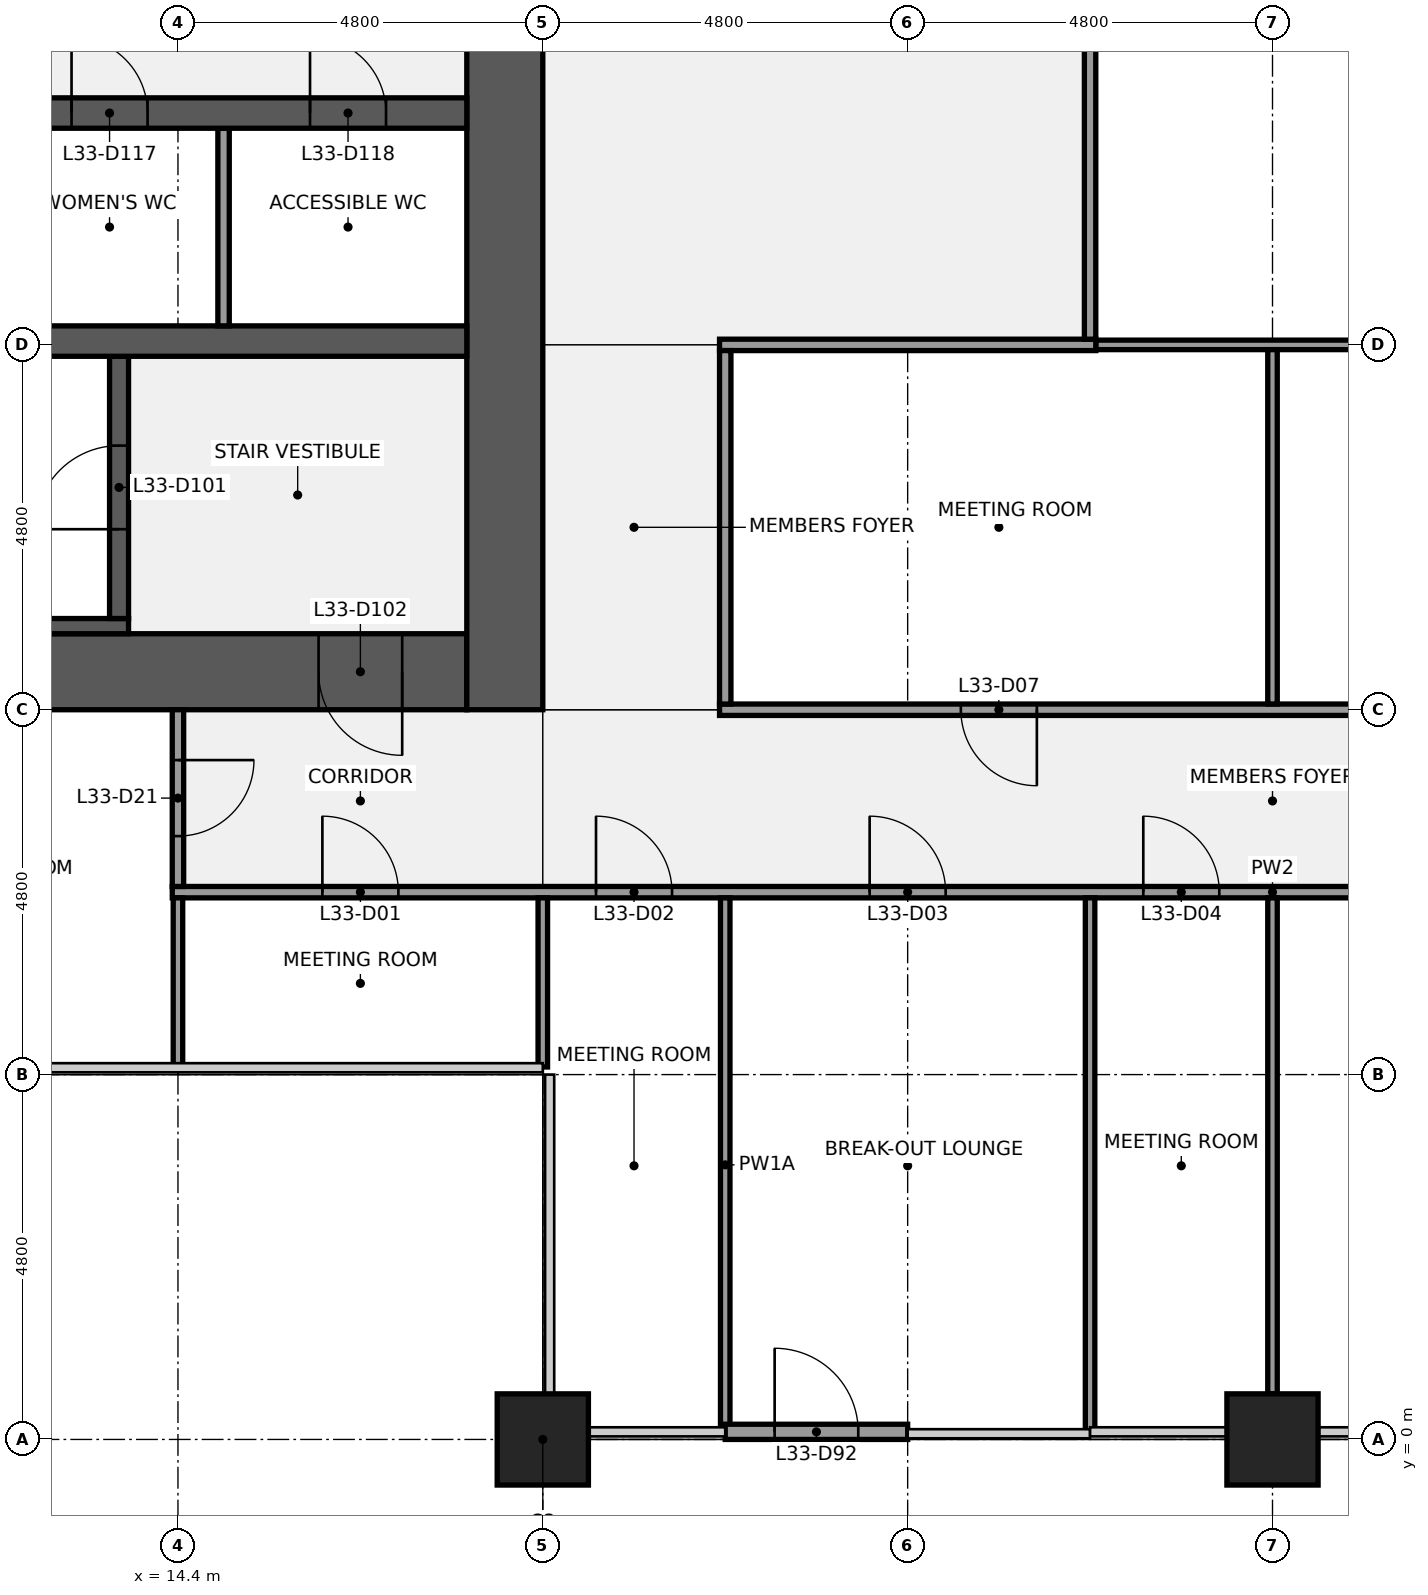
"""IFC4 building model, lengths in metres.
Left out: names, types, materials, properties, quantities, classifications, styles, units other than length and angle.
Written with IfcOpenShell. Run it as: python <this file> out.ifc"""

import sys

from ifc_helpers import new_model, si_unit, direction, frame, frame_2d, origin, origin_2d, place, context, subcontext, project, spatial, rectangle, extrude, element, fill, save


model = new_model("IFC4")
c1 = context("Model", 3, precision=1e-05, world=origin(), true_north=direction((0.0, 1.0)))
c2 = subcontext(c1, "Body", "Model", "MODEL_VIEW")
j1 = project(units=[si_unit("LENGTHUNIT", "METRE"), si_unit("PLANEANGLEUNIT", "RADIAN")], contexts=[c1])
p1 = place(None, origin())
s1 = spatial("IfcSite", under=j1, at=p1, CompositionType="ELEMENT")
p2 = place(p1, origin())
s2 = spatial("IfcBuilding", under=s1, at=p2, CompositionType="ELEMENT")
p3 = place(p2, frame((0.0, 0.0, 152.1)))
s3 = spatial("IfcBuildingStorey", under=s2, at=p3, CompositionType="ELEMENT", Elevation=152.1)
for number, where, z_axis, x_axis in (
    (1, (19.2, 0.0, 0.0), (0.0, 0.0, 1.0), (1.0, 0.0, 0.0)),
    (2, (28.8, 0.0, 0.0), (0.0, 0.0, 1.0), (1.0, 0.0, 0.0)),
):
    element("IfcColumn", number, at=place(p3, frame(where, z_axis=z_axis, x_axis=x_axis)), inside=s3, PredefinedType="COLUMN", context=c2, shape_type="SweptSolid", body=[
        extrude(rectangle(XDim=1.2, YDim=1.2, at=origin_2d()), origin(), (0.0, 0.0, 1.0), 4.0),
    ])
p4 = place(p3, frame((18.2, 10.1, 0.0), z_axis=(0.0, 0.0, 1.0), x_axis=(-1.0, 0.0, 0.0)))
e3 = element("IfcWall", 3, at=p4, inside=s3, PredefinedType="SHEAR", context=c2, shape_type="SweptSolid", body=[
    extrude(rectangle(XDim=8.6, YDim=1.0, at=frame_2d((4.3, 0.0))), origin(), (0.0, 0.0, 1.0), 3.84),
])
p5 = place(p4, frame((0.85, 0.0, 0.0)))
e4 = element("IfcOpeningElement", 4, at=p5, cuts=e3, PredefinedType="OPENING", context=c2, shape_type="SweptSolid", body=[
    extrude(rectangle(XDim=1.1, YDim=2.1, at=frame_2d((0.55, 1.05))), frame((0.0, 0.51, 0.0), z_axis=(0.0, -1.0, 0.0), x_axis=(1.0, 0.0, 0.0)), (0.0, 0.0, 1.0), 1.02),
])
p6 = place(p3, frame((18.7, 38.4, 0.0), z_axis=(0.0, 0.0, 1.0), x_axis=(0.0, -1.0, 0.0)))
e5 = element("IfcWall", 5, at=p6, inside=s3, PredefinedType="SHEAR", context=c2, shape_type="SweptSolid", body=[
    extrude(rectangle(XDim=28.8, YDim=1.0, at=frame_2d((14.4, 0.0))), origin(), (0.0, 0.0, 1.0), 3.84),
])
p7 = place(p6, frame((18.3, 0.0, 0.0)))
e6 = element("IfcOpeningElement", 6, at=p7, cuts=e5, PredefinedType="OPENING", context=c2, shape_type="SweptSolid", body=[
    extrude(rectangle(XDim=1.8, YDim=2.1, at=frame_2d((0.9, 1.05))), frame((0.0, 0.51, 0.0), z_axis=(0.0, -1.0, 0.0), x_axis=(1.0, 0.0, 0.0)), (0.0, 0.0, 1.0), 1.02),
])
p8 = place(p6, frame((8.7, 0.0, 0.0)))
e7 = element("IfcOpeningElement", 7, at=p8, cuts=e5, PredefinedType="OPENING", context=c2, shape_type="SweptSolid", body=[
    extrude(rectangle(XDim=1.8, YDim=2.1, at=frame_2d((0.9, 1.05))), frame((0.0, 0.51, 0.0), z_axis=(0.0, -1.0, 0.0), x_axis=(1.0, 0.0, 0.0)), (0.0, 0.0, 1.0), 1.02),
])
p9 = place(p3, frame((9.6, 10.7, 0.0), z_axis=(0.0, 0.0, 1.0), x_axis=(1.0, 0.0, 0.0)))
e8 = element("IfcWall", 8, at=p9, inside=s3, PredefinedType="SHEAR", context=c2, shape_type="SweptSolid", body=[
    extrude(rectangle(XDim=4.15, YDim=0.2, at=frame_2d((2.075, 0.0))), origin(), (0.0, 0.0, 1.0), 3.84),
])
p10 = place(p3, frame((13.625, 10.8, 0.0), z_axis=(0.0, 0.0, 1.0), x_axis=(0.0, 1.0, 0.0)))
e9 = element("IfcWall", 9, at=p10, inside=s3, PredefinedType="SHEAR", context=c2, shape_type="SweptSolid", body=[
    extrude(rectangle(XDim=3.45, YDim=0.25, at=frame_2d((1.725, 0.0))), origin(), (0.0, 0.0, 1.0), 3.84),
])
p11 = place(p10, frame((1.175, 0.0, 0.0)))
e10 = element("IfcOpeningElement", 10, at=p11, cuts=e9, PredefinedType="OPENING", context=c2, shape_type="SweptSolid", body=[
    extrude(rectangle(XDim=1.1, YDim=2.1, at=frame_2d((0.55, 1.05))), frame((0.0, 0.135, 0.0), z_axis=(0.0, -1.0, 0.0), x_axis=(1.0, 0.0, 0.0)), (0.0, 0.0, 1.0), 0.27),
])
p12 = place(p3, frame((1.0, 14.45, 0.0), z_axis=(0.0, 0.0, 1.0), x_axis=(1.0, 0.0, 0.0)))
e11 = element("IfcWall", 11, at=p12, inside=s3, PredefinedType="SHEAR", context=c2, shape_type="SweptSolid", body=[
    extrude(rectangle(XDim=17.2, YDim=0.4, at=frame_2d((8.6, 0.0))), origin(), (0.0, 0.0, 1.0), 3.84),
])
p13 = place(p3, frame((15.0, 14.65, 0.0), z_axis=(0.0, 0.0, 1.0), x_axis=(0.0, 1.0, 0.0)))
e12 = element("IfcWall", 12, at=p13, inside=s3, PredefinedType="PARTITIONING", context=c2, shape_type="SweptSolid", body=[
    extrude(rectangle(XDim=2.6, YDim=0.15, at=frame_2d((1.3, 0.0))), origin(), (0.0, 0.0, 1.0), 3.84),
])
p14 = place(p3, frame((1.0, 17.45, 0.0), z_axis=(0.0, 0.0, 1.0), x_axis=(1.0, 0.0, 0.0)))
e13 = element("IfcWall", 13, at=p14, inside=s3, PredefinedType="SHEAR", context=c2, shape_type="SweptSolid", body=[
    extrude(rectangle(XDim=17.2, YDim=0.4, at=frame_2d((8.6, 0.0))), origin(), (0.0, 0.0, 1.0), 3.84),
])
p15 = place(p14, frame((0.762, 0.0, 0.0)))
e14 = element("IfcOpeningElement", 14, at=p15, cuts=e13, PredefinedType="OPENING", context=c2, shape_type="SweptSolid", body=[
    extrude(rectangle(XDim=1.0, YDim=2.1, at=frame_2d((0.5, 1.05))), frame((0.0, 0.21, 0.0), z_axis=(0.0, -1.0, 0.0), x_axis=(1.0, 0.0, 0.0)), (0.0, 0.0, 1.0), 0.42),
])
p16 = place(p14, frame((3.3, 0.0, 0.0)))
e15 = element("IfcOpeningElement", 15, at=p16, cuts=e13, PredefinedType="OPENING", context=c2, shape_type="SweptSolid", body=[
    extrude(rectangle(XDim=1.0, YDim=2.1, at=frame_2d((0.5, 1.05))), frame((0.0, 0.21, 0.0), z_axis=(0.0, -1.0, 0.0), x_axis=(1.0, 0.0, 0.0)), (0.0, 0.0, 1.0), 0.42),
])
p17 = place(p14, frame((7.5, 0.0, 0.0)))
e16 = element("IfcOpeningElement", 16, at=p17, cuts=e13, PredefinedType="OPENING", context=c2, shape_type="SweptSolid", body=[
    extrude(rectangle(XDim=1.0, YDim=2.1, at=frame_2d((0.5, 1.05))), frame((0.0, 0.21, 0.0), z_axis=(0.0, -1.0, 0.0), x_axis=(1.0, 0.0, 0.0)), (0.0, 0.0, 1.0), 0.42),
])
p18 = place(p14, frame((12.0, 0.0, 0.0)))
e17 = element("IfcOpeningElement", 17, at=p18, cuts=e13, PredefinedType="OPENING", context=c2, shape_type="SweptSolid", body=[
    extrude(rectangle(XDim=1.0, YDim=2.1, at=frame_2d((0.5, 1.05))), frame((0.0, 0.21, 0.0), z_axis=(0.0, -1.0, 0.0), x_axis=(1.0, 0.0, 0.0)), (0.0, 0.0, 1.0), 0.42),
])
p19 = place(p14, frame((15.137, 0.0, 0.0)))
e18 = element("IfcOpeningElement", 18, at=p19, cuts=e13, PredefinedType="OPENING", context=c2, shape_type="SweptSolid", body=[
    extrude(rectangle(XDim=1.0, YDim=2.1, at=frame_2d((0.5, 1.05))), frame((0.0, 0.21, 0.0), z_axis=(0.0, -1.0, 0.0), x_axis=(1.0, 0.0, 0.0)), (0.0, 0.0, 1.0), 0.42),
])
p20 = place(p3, frame((14.325, 7.2, 0.0), z_axis=(0.0, 0.0, 1.0), x_axis=(1.0, 0.0, 0.0)))
e19 = element("IfcWall", 19, at=p20, inside=s3, PredefinedType="PARTITIONING", context=c2, shape_type="SweptSolid", body=[
    extrude(rectangle(XDim=28.95, YDim=0.15, at=frame_2d((14.475, 0.0))), origin(), (0.0, 0.0, 1.0), 2.936),
])
p21 = place(p20, frame((1.975, 0.0, 0.0)))
e20 = element("IfcOpeningElement", 20, at=p21, cuts=e19, PredefinedType="OPENING", context=c2, shape_type="SweptSolid", body=[
    extrude(rectangle(XDim=1.0, YDim=2.1, at=frame_2d((0.5, 1.05))), frame((0.0, 0.085, 0.0), z_axis=(0.0, -1.0, 0.0), x_axis=(1.0, 0.0, 0.0)), (0.0, 0.0, 1.0), 0.17),
])
p22 = place(p20, frame((5.575, 0.0, 0.0)))
e21 = element("IfcOpeningElement", 21, at=p22, cuts=e19, PredefinedType="OPENING", context=c2, shape_type="SweptSolid", body=[
    extrude(rectangle(XDim=1.0, YDim=2.1, at=frame_2d((0.5, 1.05))), frame((0.0, 0.085, 0.0), z_axis=(0.0, -1.0, 0.0), x_axis=(1.0, 0.0, 0.0)), (0.0, 0.0, 1.0), 0.17),
])
p23 = place(p20, frame((9.175, 0.0, 0.0)))
e22 = element("IfcOpeningElement", 22, at=p23, cuts=e19, PredefinedType="OPENING", context=c2, shape_type="SweptSolid", body=[
    extrude(rectangle(XDim=1.0, YDim=2.1, at=frame_2d((0.5, 1.05))), frame((0.0, 0.085, 0.0), z_axis=(0.0, -1.0, 0.0), x_axis=(1.0, 0.0, 0.0)), (0.0, 0.0, 1.0), 0.17),
])
p24 = place(p20, frame((12.775, 0.0, 0.0)))
e23 = element("IfcOpeningElement", 23, at=p24, cuts=e19, PredefinedType="OPENING", context=c2, shape_type="SweptSolid", body=[
    extrude(rectangle(XDim=1.0, YDim=2.1, at=frame_2d((0.5, 1.05))), frame((0.0, 0.085, 0.0), z_axis=(0.0, -1.0, 0.0), x_axis=(1.0, 0.0, 0.0)), (0.0, 0.0, 1.0), 0.17),
])
p25 = place(p20, frame((18.775, 0.0, 0.0)))
e24 = element("IfcOpeningElement", 24, at=p25, cuts=e19, PredefinedType="OPENING", context=c2, shape_type="SweptSolid", body=[
    extrude(rectangle(XDim=1.0, YDim=2.1, at=frame_2d((0.5, 1.05))), frame((0.0, 0.085, 0.0), z_axis=(0.0, -1.0, 0.0), x_axis=(1.0, 0.0, 0.0)), (0.0, 0.0, 1.0), 0.17),
])
p26 = place(p20, frame((25.975, 0.0, 0.0)))
e25 = element("IfcOpeningElement", 25, at=p26, cuts=e19, PredefinedType="OPENING", context=c2, shape_type="SweptSolid", body=[
    extrude(rectangle(XDim=1.0, YDim=2.1, at=frame_2d((0.5, 1.05))), frame((0.0, 0.085, 0.0), z_axis=(0.0, -1.0, 0.0), x_axis=(1.0, 0.0, 0.0)), (0.0, 0.0, 1.0), 0.17),
])
p27 = place(p3, frame((21.525, 9.6, 0.0), z_axis=(0.0, 0.0, 1.0), x_axis=(1.0, 0.0, 0.0)))
e26 = element("IfcWall", 26, at=p27, inside=s3, PredefinedType="PARTITIONING", context=c2, shape_type="SweptSolid", body=[
    extrude(rectangle(XDim=14.55, YDim=0.15, at=frame_2d((7.275, 0.0))), origin(), (0.0, 0.0, 1.0), 2.936),
])
p28 = place(p27, frame((3.175, 0.0, 0.0)))
e27 = element("IfcOpeningElement", 27, at=p28, cuts=e26, PredefinedType="OPENING", context=c2, shape_type="SweptSolid", body=[
    extrude(rectangle(XDim=1.0, YDim=2.1, at=frame_2d((0.5, 1.05))), frame((0.0, 0.085, 0.0), z_axis=(0.0, -1.0, 0.0), x_axis=(1.0, 0.0, 0.0)), (0.0, 0.0, 1.0), 0.17),
])
p29 = place(p27, frame((10.375, 0.0, 0.0)))
e28 = element("IfcOpeningElement", 28, at=p29, cuts=e26, PredefinedType="OPENING", context=c2, shape_type="SweptSolid", body=[
    extrude(rectangle(XDim=1.0, YDim=2.1, at=frame_2d((0.5, 1.05))), frame((0.0, 0.085, 0.0), z_axis=(0.0, -1.0, 0.0), x_axis=(1.0, 0.0, 0.0)), (0.0, 0.0, 1.0), 0.17),
])
p30 = place(p3, frame((26.475, 14.4, 0.0), z_axis=(0.0, 0.0, 1.0), x_axis=(1.0, 0.0, 0.0)))
e29 = element("IfcWall", 29, at=p30, inside=s3, PredefinedType="PARTITIONING", context=c2, shape_type="SweptSolid", body=[
    extrude(rectangle(XDim=4.8, YDim=0.125, at=frame_2d((2.4, 0.0))), origin(), (0.0, 0.0, 1.0), 2.936),
])
p31 = place(p3, frame((21.525, 14.4, 0.0), z_axis=(0.0, 0.0, 1.0), x_axis=(1.0, 0.0, 0.0)))
e30 = element("IfcWall", 30, at=p31, inside=s3, PredefinedType="PARTITIONING", context=c2, shape_type="SweptSolid", body=[
    extrude(rectangle(XDim=4.95, YDim=0.15, at=frame_2d((2.475, 0.0))), origin(), (0.0, 0.0, 1.0), 2.936),
])
p32 = place(p3, frame((14.4, 4.9, 0.0), z_axis=(0.0, 0.0, 1.0), x_axis=(0.0, 1.0, 0.0)))
e31 = element("IfcWall", 31, at=p32, inside=s3, PredefinedType="PARTITIONING", context=c2, shape_type="SweptSolid", body=[
    extrude(rectangle(XDim=2.225, YDim=0.125, at=frame_2d((1.113, 0.0))), origin(), (0.0, 0.0, 1.0), 2.936),
])
p33 = place(p3, frame((14.4, 7.275, 0.0), z_axis=(0.0, 0.0, 1.0), x_axis=(0.0, 1.0, 0.0)))
e32 = element("IfcWall", 32, at=p33, inside=s3, PredefinedType="PARTITIONING", context=c2, shape_type="SweptSolid", body=[
    extrude(rectangle(XDim=2.325, YDim=0.15, at=frame_2d((1.163, 0.0))), origin(), (0.0, 0.0, 1.0), 2.936),
])
p34 = place(p33, frame((0.663, 0.0, 0.0)))
e33 = element("IfcOpeningElement", 33, at=p34, cuts=e32, PredefinedType="OPENING", context=c2, shape_type="SweptSolid", body=[
    extrude(rectangle(XDim=1.0, YDim=2.1, at=frame_2d((0.5, 1.05))), frame((0.0, 0.085, 0.0), z_axis=(0.0, -1.0, 0.0), x_axis=(1.0, 0.0, 0.0)), (0.0, 0.0, 1.0), 0.17),
])
p35 = place(p3, frame((19.2, 4.9, 0.0), z_axis=(0.0, 0.0, 1.0), x_axis=(0.0, 1.0, 0.0)))
e34 = element("IfcWall", 34, at=p35, inside=s3, PredefinedType="PARTITIONING", context=c2, shape_type="SweptSolid", body=[
    extrude(rectangle(XDim=2.225, YDim=0.125, at=frame_2d((1.113, 0.0))), origin(), (0.0, 0.0, 1.0), 2.936),
])
p36 = place(p3, frame((21.6, 0.1, 0.0), z_axis=(0.0, 0.0, 1.0), x_axis=(0.0, 1.0, 0.0)))
e35 = element("IfcWall", 35, at=p36, inside=s3, PredefinedType="PARTITIONING", context=c2, shape_type="SweptSolid", body=[
    extrude(rectangle(XDim=7.025, YDim=0.125, at=frame_2d((3.512, 0.0))), origin(), (0.0, 0.0, 1.0), 2.936),
])
p37 = place(p3, frame((21.6, 9.675, 0.0), z_axis=(0.0, 0.0, 1.0), x_axis=(0.0, 1.0, 0.0)))
e36 = element("IfcWall", 36, at=p37, inside=s3, PredefinedType="PARTITIONING", context=c2, shape_type="SweptSolid", body=[
    extrude(rectangle(XDim=4.65, YDim=0.15, at=frame_2d((2.325, 0.0))), origin(), (0.0, 0.0, 1.0), 2.936),
])
p38 = place(p3, frame((26.4, 0.1, 0.0), z_axis=(0.0, 0.0, 1.0), x_axis=(0.0, 1.0, 0.0)))
e37 = element("IfcWall", 37, at=p38, inside=s3, PredefinedType="PARTITIONING", context=c2, shape_type="SweptSolid", body=[
    extrude(rectangle(XDim=7.025, YDim=0.125, at=frame_2d((3.512, 0.0))), origin(), (0.0, 0.0, 1.0), 2.936),
])
p39 = place(p3, frame((26.4, 14.475, 0.0), z_axis=(0.0, 0.0, 1.0), x_axis=(0.0, 1.0, 0.0)))
e38 = element("IfcWall", 38, at=p39, inside=s3, PredefinedType="PARTITIONING", context=c2, shape_type="SweptSolid", body=[
    extrude(rectangle(XDim=13.05, YDim=0.15, at=frame_2d((6.525, 0.0))), origin(), (0.0, 0.0, 1.0), 2.936),
])
p40 = place(p39, frame((6.025, 0.0, 0.0)))
e39 = element("IfcOpeningElement", 39, at=p40, cuts=e38, PredefinedType="OPENING", context=c2, shape_type="SweptSolid", body=[
    extrude(rectangle(XDim=1.0, YDim=2.1, at=frame_2d((0.5, 1.05))), frame((0.0, 0.085, 0.0), z_axis=(0.0, -1.0, 0.0), x_axis=(1.0, 0.0, 0.0)), (0.0, 0.0, 1.0), 0.17),
])
p41 = place(p3, frame((28.8, 0.6, 0.0), z_axis=(0.0, 0.0, 1.0), x_axis=(0.0, 1.0, 0.0)))
e40 = element("IfcWall", 40, at=p41, inside=s3, PredefinedType="PARTITIONING", context=c2, shape_type="SweptSolid", body=[
    extrude(rectangle(XDim=6.525, YDim=0.125, at=frame_2d((3.262, 0.0))), origin(), (0.0, 0.0, 1.0), 2.936),
])
p42 = place(p3, frame((28.8, 9.675, 0.0), z_axis=(0.0, 0.0, 1.0), x_axis=(0.0, 1.0, 0.0)))
e41 = element("IfcWall", 41, at=p42, inside=s3, PredefinedType="PARTITIONING", context=c2, shape_type="SweptSolid", body=[
    extrude(rectangle(XDim=4.662, YDim=0.125, at=frame_2d((2.331, 0.0))), origin(), (0.0, 0.0, 1.0), 2.936),
])
p43 = place(p3, frame((21.6, 0.1, 0.0), z_axis=(0.0, 0.0, 1.0), x_axis=(1.0, 0.0, 0.0)))
e42 = element("IfcWall", 42, at=p43, inside=s3, PredefinedType="SOLIDWALL", context=c2, shape_type="SweptSolid", body=[
    extrude(rectangle(XDim=2.4, YDim=0.2, at=frame_2d((1.2, 0.0))), origin(), (0.0, 0.0, 1.0), 3.314),
])
p44 = place(p43, frame((0.65, 0.0, 0.0)))
e43 = element("IfcOpeningElement", 43, at=p44, cuts=e42, PredefinedType="OPENING", context=c2, shape_type="SweptSolid", body=[
    extrude(rectangle(XDim=1.1, YDim=2.1, at=frame_2d((0.55, 1.05))), frame((0.0, 0.11, 0.0), z_axis=(0.0, -1.0, 0.0), x_axis=(1.0, 0.0, 0.0)), (0.0, 0.0, 1.0), 0.22),
])
p45 = place(p3, frame((19.2, -1.05, 0.0), z_axis=(0.0, 0.0, 1.0), x_axis=(1.0, 0.0, 0.0)))
e44 = element("IfcColumn", 44, at=p45, inside=s3, PredefinedType="PILASTER", context=c2, shape_type="SweptSolid", body=[
    extrude(rectangle(XDim=3.6, YDim=0.9, at=origin_2d()), origin(), (0.0, 0.0, 1.0), 4.0),
])
p46 = place(p11, origin())
e45 = element("IfcDoor", 45, at=p46, inside=s3, OperationType="SINGLE_SWING_LEFT", PredefinedType="DOOR", context=c2, shape_type="SweptSolid", body=[
    extrude(rectangle(XDim=1.1, YDim=2.1, at=frame_2d((0.55, 1.05))), frame((0.0, 0.025, 0.0), z_axis=(0.0, -1.0, 0.0), x_axis=(1.0, 0.0, 0.0)), (0.0, 0.0, 1.0), 0.05),
])
fill(e10, e45)
p47 = place(p5, origin())
e46 = element("IfcDoor", 46, at=p47, inside=s3, OperationType="SINGLE_SWING_LEFT", PredefinedType="DOOR", context=c2, shape_type="SweptSolid", body=[
    extrude(rectangle(XDim=1.1, YDim=2.1, at=frame_2d((0.55, 1.05))), frame((0.0, 0.025, 0.0), z_axis=(0.0, -1.0, 0.0), x_axis=(1.0, 0.0, 0.0)), (0.0, 0.0, 1.0), 0.05),
])
fill(e4, e46)
p48 = place(p18, origin())
e47 = element("IfcDoor", 47, at=p48, inside=s3, OperationType="SINGLE_SWING_LEFT", PredefinedType="DOOR", context=c2, shape_type="SweptSolid", body=[
    extrude(rectangle(XDim=1.0, YDim=2.1, at=frame_2d((0.5, 1.05))), frame((0.0, 0.025, 0.0), z_axis=(0.0, -1.0, 0.0), x_axis=(1.0, 0.0, 0.0)), (0.0, 0.0, 1.0), 0.05),
])
fill(e17, e47)
p49 = place(p19, origin())
e48 = element("IfcDoor", 48, at=p49, inside=s3, OperationType="SINGLE_SWING_LEFT", PredefinedType="DOOR", context=c2, shape_type="SweptSolid", body=[
    extrude(rectangle(XDim=1.0, YDim=2.1, at=frame_2d((0.5, 1.05))), frame((0.0, 0.025, 0.0), z_axis=(0.0, -1.0, 0.0), x_axis=(1.0, 0.0, 0.0)), (0.0, 0.0, 1.0), 0.05),
])
fill(e18, e48)
p50 = place(p21, origin())
e49 = element("IfcDoor", 49, at=p50, inside=s3, OperationType="SINGLE_SWING_LEFT", PredefinedType="DOOR", context=c2, shape_type="SweptSolid", body=[
    extrude(rectangle(XDim=1.0, YDim=2.1, at=frame_2d((0.5, 1.05))), frame((0.0, 0.025, 0.0), z_axis=(0.0, -1.0, 0.0), x_axis=(1.0, 0.0, 0.0)), (0.0, 0.0, 1.0), 0.05),
])
fill(e20, e49)
p51 = place(p22, origin())
e50 = element("IfcDoor", 50, at=p51, inside=s3, OperationType="SINGLE_SWING_LEFT", PredefinedType="DOOR", context=c2, shape_type="SweptSolid", body=[
    extrude(rectangle(XDim=1.0, YDim=2.1, at=frame_2d((0.5, 1.05))), frame((0.0, 0.025, 0.0), z_axis=(0.0, -1.0, 0.0), x_axis=(1.0, 0.0, 0.0)), (0.0, 0.0, 1.0), 0.05),
])
fill(e21, e50)
p52 = place(p23, origin())
e51 = element("IfcDoor", 51, at=p52, inside=s3, OperationType="SINGLE_SWING_LEFT", PredefinedType="DOOR", context=c2, shape_type="SweptSolid", body=[
    extrude(rectangle(XDim=1.0, YDim=2.1, at=frame_2d((0.5, 1.05))), frame((0.0, 0.025, 0.0), z_axis=(0.0, -1.0, 0.0), x_axis=(1.0, 0.0, 0.0)), (0.0, 0.0, 1.0), 0.05),
])
fill(e22, e51)
p53 = place(p24, origin())
e52 = element("IfcDoor", 52, at=p53, inside=s3, OperationType="SINGLE_SWING_LEFT", PredefinedType="DOOR", context=c2, shape_type="SweptSolid", body=[
    extrude(rectangle(XDim=1.0, YDim=2.1, at=frame_2d((0.5, 1.05))), frame((0.0, 0.025, 0.0), z_axis=(0.0, -1.0, 0.0), x_axis=(1.0, 0.0, 0.0)), (0.0, 0.0, 1.0), 0.05),
])
fill(e23, e52)
p54 = place(p28, origin())
e53 = element("IfcDoor", 53, at=p54, inside=s3, OperationType="SINGLE_SWING_RIGHT", PredefinedType="DOOR", context=c2, shape_type="SweptSolid", body=[
    extrude(rectangle(XDim=1.0, YDim=2.1, at=frame_2d((0.5, 1.05))), frame((0.0, 0.025, 0.0), z_axis=(0.0, -1.0, 0.0), x_axis=(1.0, 0.0, 0.0)), (0.0, 0.0, 1.0), 0.05),
])
fill(e27, e53)
p55 = place(p34, origin())
e54 = element("IfcDoor", 54, at=p55, inside=s3, OperationType="SINGLE_SWING_RIGHT", PredefinedType="DOOR", context=c2, shape_type="SweptSolid", body=[
    extrude(rectangle(XDim=1.0, YDim=2.1, at=frame_2d((0.5, 1.05))), frame((0.0, 0.025, 0.0), z_axis=(0.0, -1.0, 0.0), x_axis=(1.0, 0.0, 0.0)), (0.0, 0.0, 1.0), 0.05),
])
fill(e33, e54)
p56 = place(p44, origin())
e55 = element("IfcDoor", 55, at=p56, inside=s3, OperationType="SINGLE_SWING_LEFT", PredefinedType="DOOR", context=c2, shape_type="SweptSolid", body=[
    extrude(rectangle(XDim=1.1, YDim=2.1, at=frame_2d((0.55, 1.05))), frame((0.0, 0.025, 0.0), z_axis=(0.0, -1.0, 0.0), x_axis=(1.0, 0.0, 0.0)), (0.0, 0.0, 1.0), 0.05),
])
fill(e43, e55)
save(model, sys.argv[1])
